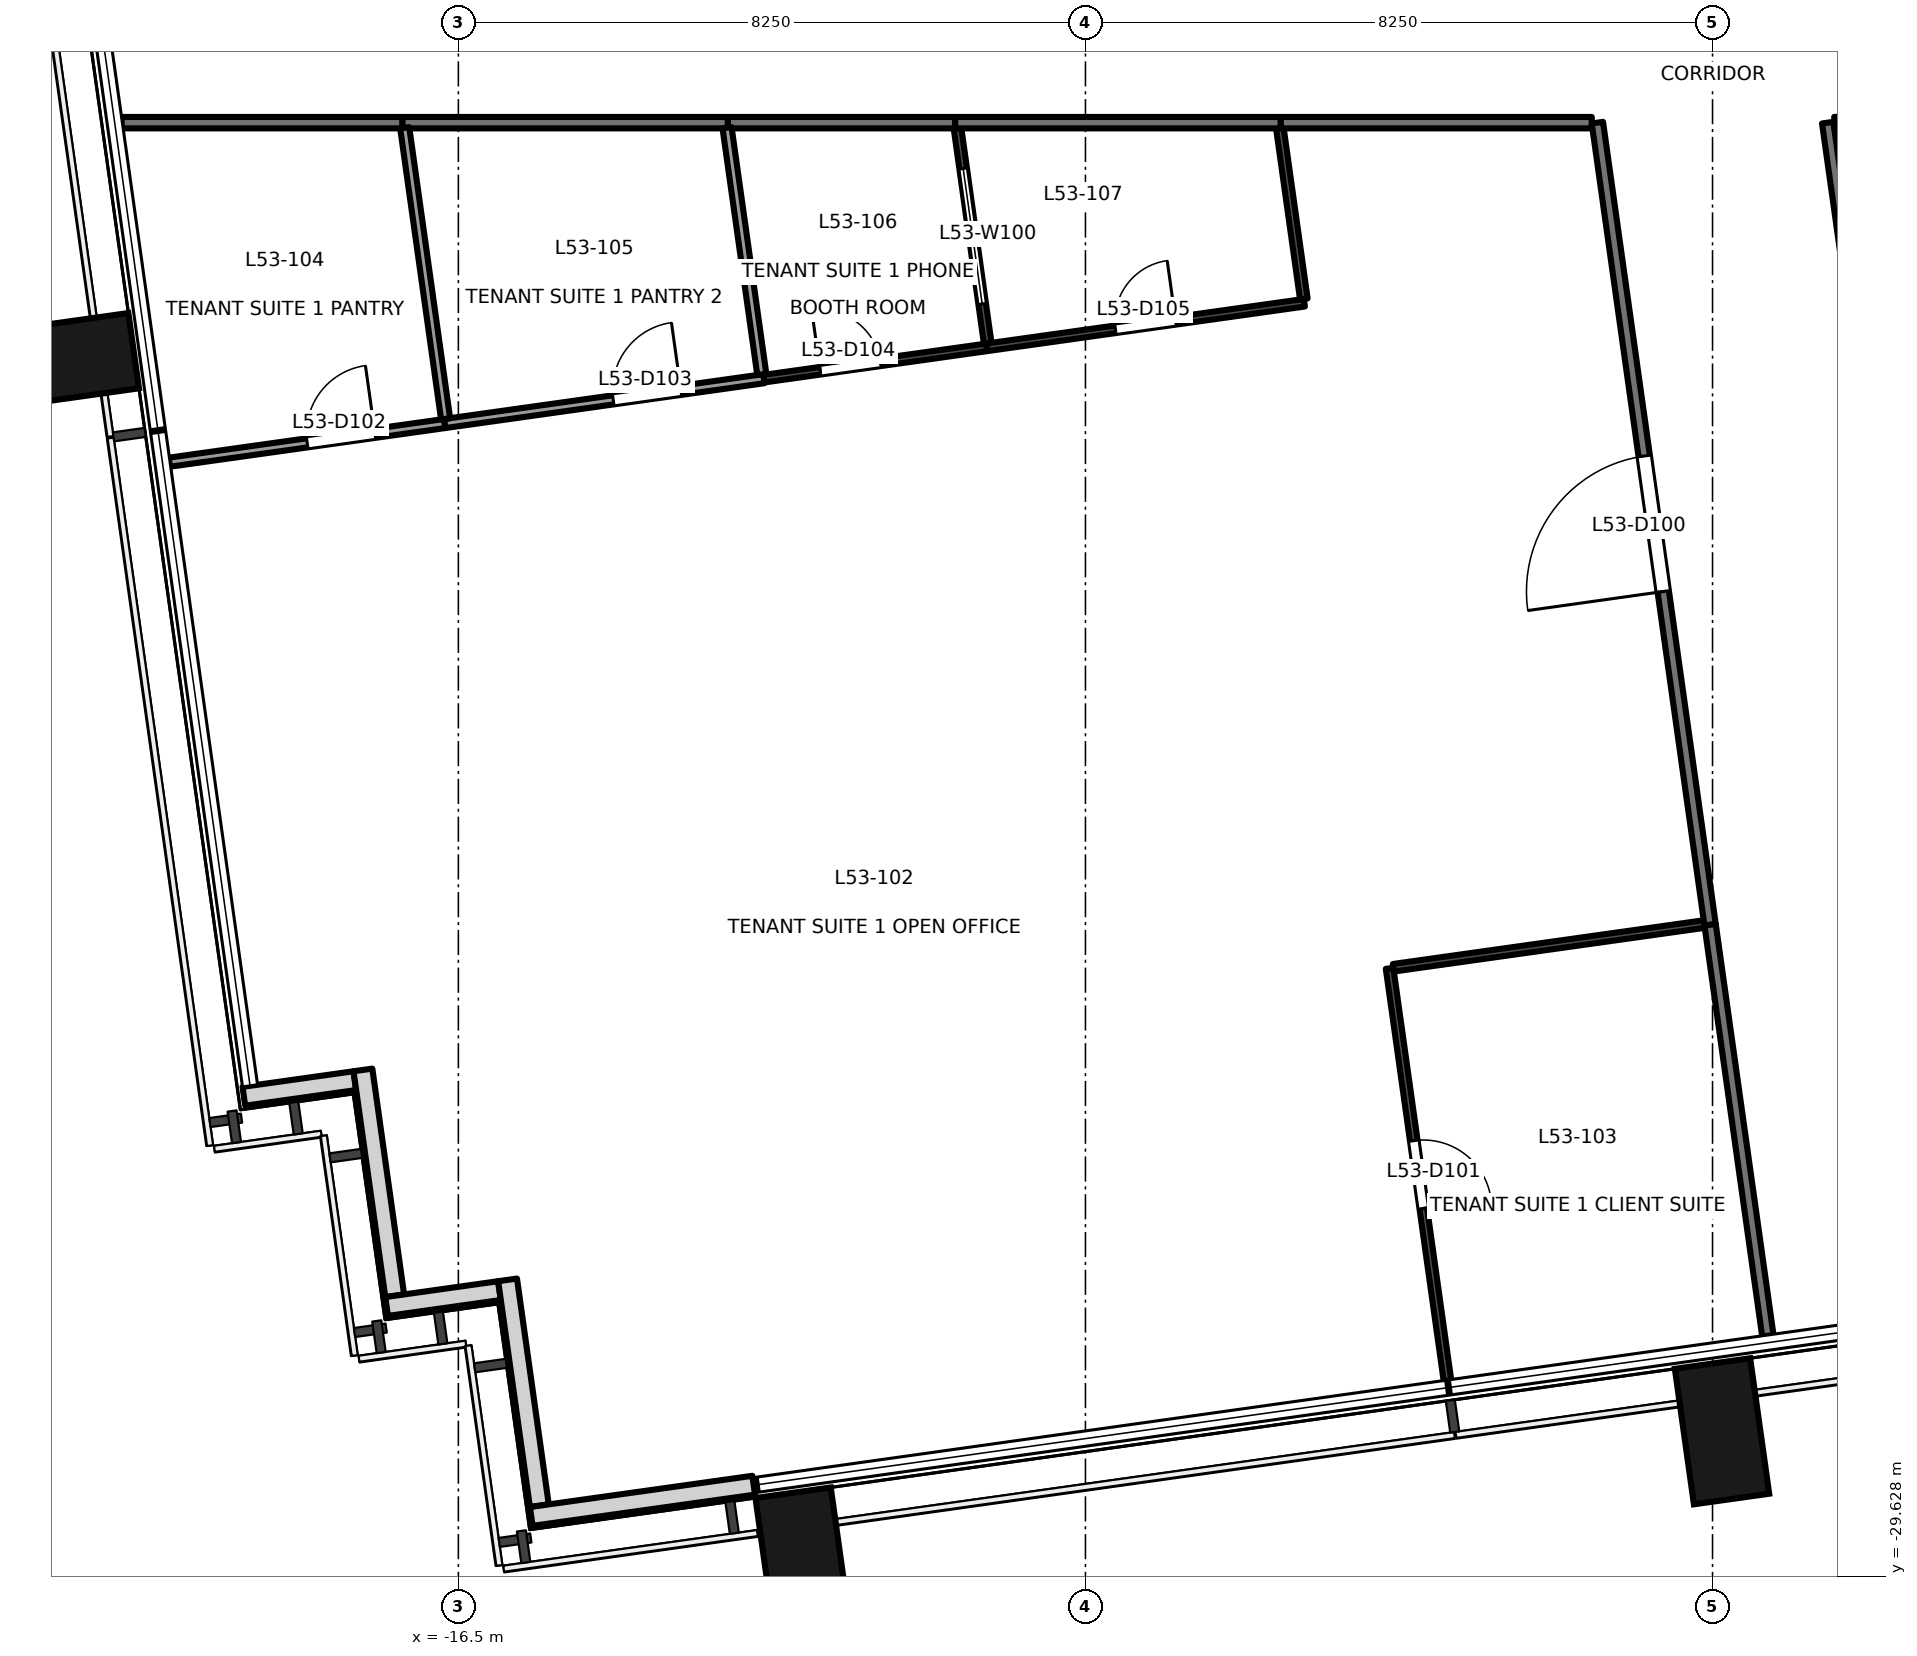
"""IFC4 building model, lengths in metres.
Left out: names, types, materials, properties, quantities, classifications, styles, units other than length and angle.
Written with IfcOpenShell. Run it as: python <this file> out.ifc"""

import sys

from ifc_helpers import new_model, si_unit, direction, frame, frame_2d, origin, origin_2d, place, context, subcontext, project, spatial, rectangle, extrude, element, fill, save


model = new_model("IFC4")
c1 = context("Model", 3, precision=1e-05, world=origin(), true_north=direction((0.0, 1.0)))
c2 = subcontext(c1, "Body", "Model", "MODEL_VIEW")
j1 = project(units=[si_unit("LENGTHUNIT", "METRE"), si_unit("PLANEANGLEUNIT", "RADIAN")], contexts=[c1])
p1 = place(None, origin())
s1 = spatial("IfcSite", under=j1, at=p1, CompositionType="ELEMENT")
p2 = place(p1, origin())
s2 = spatial("IfcBuilding", under=s1, at=p2, CompositionType="ELEMENT")
p3 = place(p2, frame((0.0, 0.0, 233.0)))
s3 = spatial("IfcBuildingStorey", under=s2, at=p3, CompositionType="ELEMENT", Elevation=233.0)
for number, where, z_axis, x_axis in (
    (1, (-11.971, -29.416, -0.2), (0.0, 0.0, 1.0), (0.99, 0.139, 0.0)),
    (2, (0.125, -27.716, -0.2), (0.0, 0.0, 1.0), (0.99, 0.139, 0.0)),
    (3, (-21.663, -13.625, -0.2), (0.0, 0.0, 1.0), (-0.139, 0.99, 0.0)),
):
    element("IfcColumn", number, at=place(p3, frame(where, z_axis=z_axis, x_axis=x_axis)), inside=s3, PredefinedType="COLUMN", context=c2, shape_type="SweptSolid", body=[
        extrude(rectangle(XDim=1.0, YDim=1.8, at=origin_2d()), origin(), (0.0, 0.0, 1.0), 3.9),
    ])
p4 = place(p3, frame((-19.322, -23.309, 0.0), z_axis=(0.0, 0.0, 1.0), x_axis=(0.990235520307, 0.13940449893, 0.0)))
e4 = element("IfcWall", 4, at=p4, inside=s3, PredefinedType="SOLIDWALL", context=c2, shape_type="SweptSolid", body=[
    extrude(rectangle(XDim=1.475, YDim=0.25, at=frame_2d((0.737, 0.0))), origin(), (0.0, 0.0, 1.0), 3.7),
])
p5 = place(p3, frame((-17.756, -22.962, 0.0), z_axis=(0.0, 0.0, 1.0), x_axis=(0.139393225799, -0.990237107263, 0.0)))
e5 = element("IfcWall", 5, at=p5, inside=s3, PredefinedType="SOLIDWALL", context=c2, shape_type="SweptSolid", body=[
    extrude(rectangle(XDim=3.0, YDim=0.25, at=frame_2d((1.5, 0.0))), origin(), (0.0, 0.0, 1.0), 3.7),
])
p6 = place(p3, frame((-17.444, -26.074, 0.0), z_axis=(0.0, 0.0, 1.0), x_axis=(0.990240434918, 0.139369584395, 0.0)))
e6 = element("IfcWall", 6, at=p6, inside=s3, PredefinedType="SOLIDWALL", context=c2, shape_type="SweptSolid", body=[
    extrude(rectangle(XDim=1.5, YDim=0.25, at=frame_2d((0.75, 0.0))), origin(), (0.0, 0.0, 1.0), 3.7),
])
p7 = place(p3, frame((-15.853, -25.724, 0.0), z_axis=(0.0, 0.0, 1.0), x_axis=(0.139302206688, -0.990249915532, 0.0)))
e7 = element("IfcWall", 7, at=p7, inside=s3, PredefinedType="SOLIDWALL", context=c2, shape_type="SweptSolid", body=[
    extrude(rectangle(XDim=3.0, YDim=0.25, at=frame_2d((1.5, 0.0))), origin(), (0.0, 0.0, 1.0), 3.7),
])
p8 = place(p3, frame((-15.541, -28.836, 0.0), z_axis=(0.0, 0.0, 1.0), x_axis=(0.990285396533, 0.139049751574, 0.0)))
e8 = element("IfcWall", 8, at=p8, inside=s3, PredefinedType="SOLIDWALL", context=c2, shape_type="SweptSolid", body=[
    extrude(rectangle(XDim=2.955, YDim=0.25, at=frame_2d((1.478, 0.0))), origin(), (0.0, 0.0, 1.0), 3.7),
])
p9 = place(p3, frame((-1.589, -10.5, 0.0), z_axis=(0.0, 0.0, 1.0), x_axis=(-1.0, 0.0, 0.0)))
e9 = element("IfcWall", 9, at=p9, inside=s3, PredefinedType="PARTITIONING", context=c2, shape_type="SweptSolid", body=[
    extrude(rectangle(XDim=4.094, YDim=0.15, at=frame_2d((2.047, 0.0))), origin(), (0.0, 0.0, 1.0), 2.8),
])
p10 = place(p3, frame((-0.032, -21.053, 0.0), z_axis=(0.0, 0.0, 1.0), x_axis=(-0.139153385275, 0.9902708394, 0.0)))
e10 = element("IfcWall", 10, at=p10, inside=s3, PredefinedType="PARTITIONING", context=c2, shape_type="SweptSolid", body=[
    extrude(rectangle(XDim=10.657, YDim=0.15, at=frame_2d((5.328, 0.0))), origin(), (0.0, 0.0, 1.0), 2.8),
])
p11 = place(p10, frame((4.428, 0.0, 0.0)))
e11 = element("IfcOpeningElement", 11, at=p11, cuts=e10, PredefinedType="OPENING", context=c2, shape_type="SweptSolid", body=[
    extrude(rectangle(XDim=1.8, YDim=2.1, at=frame_2d((0.9, 1.05))), frame((0.0, 0.085, 0.0), z_axis=(0.0, -1.0, 0.0), x_axis=(1.0, 0.0, 0.0)), (0.0, 0.0, 1.0), 0.171),
])
p12 = place(p3, frame((0.728, -26.46, 0.0), z_axis=(0.0, 0.0, 1.0), x_axis=(-0.139192487281, 0.990265343978, 0.0)))
e12 = element("IfcWall", 12, at=p12, inside=s3, PredefinedType="PARTITIONING", context=c2, shape_type="SweptSolid", body=[
    extrude(rectangle(XDim=5.46, YDim=0.15, at=frame_2d((2.73, 0.0))), origin(), (0.0, 0.0, 1.0), 2.8),
])
p13 = place(p3, frame((-17.235, -10.5, 0.0), z_axis=(0.0, 0.0, 1.0), x_axis=(-1.0, 0.0, 0.0)))
e13 = element("IfcWall", 13, at=p13, inside=s3, PredefinedType="PARTITIONING", context=c2, shape_type="SweptSolid", body=[
    extrude(rectangle(XDim=3.695, YDim=0.15, at=frame_2d((1.847, 0.0))), origin(), (0.0, 0.0, 1.0), 3.7),
])
p14 = place(p3, frame((-12.954, -10.5, 0.0), z_axis=(0.0, 0.0, 1.0), x_axis=(-1.0, 0.0, 0.0)))
e14 = element("IfcWall", 14, at=p14, inside=s3, PredefinedType="PARTITIONING", context=c2, shape_type="SweptSolid", body=[
    extrude(rectangle(XDim=4.281, YDim=0.15, at=frame_2d((2.141, 0.0))), origin(), (0.0, 0.0, 1.0), 3.7),
])
p15 = place(p3, frame((-9.964, -10.5, 0.0), z_axis=(0.0, 0.0, 1.0), x_axis=(-1.0, 0.0, 0.0)))
e15 = element("IfcWall", 15, at=p15, inside=s3, PredefinedType="PARTITIONING", context=c2, shape_type="SweptSolid", body=[
    extrude(rectangle(XDim=2.99, YDim=0.15, at=frame_2d((1.495, 0.0))), origin(), (0.0, 0.0, 1.0), 3.7),
])
p16 = place(p3, frame((-5.683, -10.5, 0.0), z_axis=(0.0, 0.0, 1.0), x_axis=(-1.0, 0.0, 0.0)))
e16 = element("IfcWall", 16, at=p16, inside=s3, PredefinedType="PARTITIONING", context=c2, shape_type="SweptSolid", body=[
    extrude(rectangle(XDim=4.281, YDim=0.15, at=frame_2d((2.141, 0.0))), origin(), (0.0, 0.0, 1.0), 2.8),
])
p17 = place(p3, frame((1.515, -10.5, 0.0), z_axis=(0.0, 0.0, 1.0), x_axis=(0.139146821365, -0.990271761742, 0.0)))
e17 = element("IfcWall", 17, at=p17, inside=s3, PredefinedType="PARTITIONING", context=c2, shape_type="SweptSolid", body=[
    extrude(rectangle(XDim=4.779, YDim=0.15, at=frame_2d((2.39, 0.0))), origin(), (0.0, 0.0, 1.0), 3.7),
])
p18 = place(p3, frame((4.524, -10.499, 0.0), z_axis=(0.0, 0.0, 1.0), x_axis=(-1.0, 0.0, 0.0)))
e18 = element("IfcWall", 18, at=p18, inside=s3, PredefinedType="PARTITIONING", context=c2, shape_type="SweptSolid", body=[
    extrude(rectangle(XDim=2.923, YDim=0.15, at=frame_2d((1.461, 0.0))), origin(), (0.0, 0.0, 1.0), 2.8),
])
p19 = place(p3, frame((-4.249, -21.625, 0.0), z_axis=(0.0, 0.0, 1.0), x_axis=(0.13906298859, -0.990283537783, 0.0)))
e19 = element("IfcWall", 19, at=p19, inside=s3, PredefinedType="PARTITIONING", context=c2, shape_type="SweptSolid", body=[
    extrude(rectangle(XDim=5.479, YDim=0.1, at=frame_2d((2.74, 0.0))), origin(), (0.0, 0.0, 1.0), 3.7),
])
p20 = place(p19, frame((2.29, 0.0, 0.0)))
e20 = element("IfcOpeningElement", 20, at=p20, cuts=e19, PredefinedType="OPENING", context=c2, shape_type="SweptSolid", body=[
    extrude(rectangle(XDim=0.9, YDim=2.1, at=frame_2d((0.45, 1.05))), frame((0.0, 0.061, 0.0), z_axis=(0.0, -1.0, 0.0), x_axis=(1.0, 0.0, 0.0)), (0.0, 0.0, 1.0), 0.121),
])
p21 = place(p3, frame((-0.109, -21.043, 0.0), z_axis=(0.0, 0.0, 1.0), x_axis=(-0.990263837068, -0.139203207563, 0.0)))
e21 = element("IfcWall", 21, at=p21, inside=s3, PredefinedType="PARTITIONING", context=c2, shape_type="SweptSolid", body=[
    extrude(rectangle(XDim=4.13, YDim=0.1, at=frame_2d((2.065, 0.0))), origin(), (0.0, 0.0, 1.0), 2.8),
])
p22 = place(p3, frame((-20.303, -14.967, 0.0), z_axis=(0.0, 0.0, 1.0), x_axis=(0.990278989802, 0.139095371445, 0.0)))
e22 = element("IfcWall", 22, at=p22, inside=s3, PredefinedType="PARTITIONING", context=c2, shape_type="SweptSolid", body=[
    extrude(rectangle(XDim=3.66, YDim=0.12, at=frame_2d((1.83, 0.0))), origin(), (0.0, 0.0, 1.0), 3.7),
])
p23 = place(p22, frame((1.832, 0.0, 0.0)))
e23 = element("IfcOpeningElement", 23, at=p23, cuts=e22, PredefinedType="OPENING", context=c2, shape_type="SweptSolid", body=[
    extrude(rectangle(XDim=0.9, YDim=2.1, at=frame_2d((0.45, 1.05))), frame((0.0, 0.071, 0.0), z_axis=(0.0, -1.0, 0.0), x_axis=(1.0, 0.0, 0.0)), (0.0, 0.0, 1.0), 0.141),
])
p24 = place(p3, frame((-16.679, -14.458, 0.0), z_axis=(0.0, 0.0, 1.0), x_axis=(0.990269352743, 0.139163964508, 0.0)))
e24 = element("IfcWall", 24, at=p24, inside=s3, PredefinedType="PARTITIONING", context=c2, shape_type="SweptSolid", body=[
    extrude(rectangle(XDim=4.24, YDim=0.12, at=frame_2d((2.12, 0.0))), origin(), (0.0, 0.0, 1.0), 3.7),
])
p25 = place(p24, frame((2.238, 0.0, 0.0)))
e25 = element("IfcOpeningElement", 25, at=p25, cuts=e24, PredefinedType="OPENING", context=c2, shape_type="SweptSolid", body=[
    extrude(rectangle(XDim=0.9, YDim=2.1, at=frame_2d((0.45, 1.05))), frame((0.0, 0.071, 0.0), z_axis=(0.0, -1.0, 0.0), x_axis=(1.0, 0.0, 0.0)), (0.0, 0.0, 1.0), 0.141),
])
p26 = place(p3, frame((-12.48, -13.868, 0.0), z_axis=(0.0, 0.0, 1.0), x_axis=(0.990270259545, 0.139157511691, 0.0)))
e26 = element("IfcWall", 26, at=p26, inside=s3, PredefinedType="PARTITIONING", context=c2, shape_type="SweptSolid", body=[
    extrude(rectangle(XDim=2.96, YDim=0.1, at=frame_2d((1.48, 0.0))), origin(), (0.0, 0.0, 1.0), 3.7),
])
p27 = place(p26, frame((0.748, 0.0, 0.0)))
e27 = element("IfcOpeningElement", 27, at=p27, cuts=e26, PredefinedType="OPENING", context=c2, shape_type="SweptSolid", body=[
    extrude(rectangle(XDim=0.8, YDim=2.1, at=frame_2d((0.4, 1.05))), frame((0.0, 0.061, 0.0), z_axis=(0.0, -1.0, 0.0), x_axis=(1.0, 0.0, 0.0)), (0.0, 0.0, 1.0), 0.121),
])
p28 = place(p3, frame((-9.549, -13.456, 0.0), z_axis=(0.0, 0.0, 1.0), x_axis=(0.99027315077, 0.139136935655, 0.0)))
e28 = element("IfcWall", 28, at=p28, inside=s3, PredefinedType="PARTITIONING", context=c2, shape_type="SweptSolid", body=[
    extrude(rectangle(XDim=4.22, YDim=0.1, at=frame_2d((2.11, 0.0))), origin(), (0.0, 0.0, 1.0), 2.8),
])
p29 = place(p28, frame((1.71, 0.0, 0.0)))
e29 = element("IfcOpeningElement", 29, at=p29, cuts=e28, PredefinedType="OPENING", context=c2, shape_type="SweptSolid", body=[
    extrude(rectangle(XDim=0.8, YDim=2.1, at=frame_2d((0.4, 1.05))), frame((0.0, 0.061, 0.0), z_axis=(0.0, -1.0, 0.0), x_axis=(1.0, 0.0, 0.0)), (0.0, 0.0, 1.0), 0.121),
])
p30 = place(p3, frame((-5.377, -12.819, 0.0), z_axis=(0.0, 0.0, 1.0), x_axis=(-0.139090262588, 0.990279707382, 0.0)))
e30 = element("IfcWall", 30, at=p30, inside=s3, PredefinedType="PARTITIONING", context=c2, shape_type="SweptSolid", body=[
    extrude(rectangle(XDim=2.273, YDim=0.1, at=frame_2d((1.137, 0.0))), origin(), (0.0, 0.0, 1.0), 3.7),
])
p31 = place(p3, frame((-17.206, -10.567, 0.0), z_axis=(0.0, 0.0, 1.0), x_axis=(0.139158089335, -0.990270178372, 0.0)))
e31 = element("IfcWall", 31, at=p31, inside=s3, PredefinedType="PARTITIONING", context=c2, shape_type="SweptSolid", body=[
    extrude(rectangle(XDim=3.867, YDim=0.12, at=frame_2d((1.933, 0.0))), origin(), (0.0, 0.0, 1.0), 3.7),
])
p32 = place(p3, frame((-12.965, -10.567, 0.0), z_axis=(0.0, 0.0, 1.0), x_axis=(0.139460290977, -0.990227664348, 0.0)))
e32 = element("IfcWall", 32, at=p32, inside=s3, PredefinedType="PARTITIONING", context=c2, shape_type="SweptSolid", body=[
    extrude(rectangle(XDim=3.277, YDim=0.12, at=frame_2d((1.639, 0.0))), origin(), (0.0, 0.0, 1.0), 3.7),
])
p33 = place(p3, frame((-9.934, -10.568, 0.0), z_axis=(0.0, 0.0, 1.0), x_axis=(0.139092802353, -0.990279350655, 0.0)))
e33 = element("IfcWall", 33, at=p33, inside=s3, PredefinedType="PARTITIONING", context=c2, shape_type="SweptSolid", body=[
    extrude(rectangle(XDim=2.863, YDim=0.1, at=frame_2d((1.431, 0.0))), origin(), (0.0, 0.0, 1.0), 3.7),
])
p34 = place(p33, frame((0.54, 0.0, 0.9)))
e34 = element("IfcOpeningElement", 34, at=p34, cuts=e33, PredefinedType="OPENING", context=c2, shape_type="SweptSolid", body=[
    extrude(rectangle(XDim=1.8, YDim=1.2, at=frame_2d((0.9, 0.6))), frame((0.0, 0.061, 0.0), z_axis=(0.0, -1.0, 0.0), x_axis=(1.0, 0.0, 0.0)), (0.0, 0.0, 1.0), 0.121),
])
p35 = place(p11, origin())
e35 = element("IfcDoor", 35, at=p35, inside=s3, OperationType="DOUBLE_DOOR_SINGLE_SWING", PredefinedType="DOOR", context=c2, shape_type="SweptSolid", body=[
    extrude(rectangle(XDim=1.8, YDim=2.1, at=frame_2d((0.9, 1.05))), frame((0.0, 0.025, 0.0), z_axis=(0.0, -1.0, 0.0), x_axis=(1.0, 0.0, 0.0)), (0.0, 0.0, 1.0), 0.05),
])
fill(e11, e35)
p36 = place(p20, origin())
e36 = element("IfcDoor", 36, at=p36, inside=s3, OperationType="SINGLE_SWING_RIGHT", PredefinedType="DOOR", context=c2, shape_type="SweptSolid", body=[
    extrude(rectangle(XDim=0.9, YDim=2.1, at=frame_2d((0.45, 1.05))), frame((0.0, 0.025, 0.0), z_axis=(0.0, -1.0, 0.0), x_axis=(1.0, 0.0, 0.0)), (0.0, 0.0, 1.0), 0.05),
])
fill(e20, e36)
p37 = place(p23, origin())
e37 = element("IfcDoor", 37, at=p37, inside=s3, OperationType="SINGLE_SWING_RIGHT", PredefinedType="DOOR", context=c2, shape_type="SweptSolid", body=[
    extrude(rectangle(XDim=0.9, YDim=2.1, at=frame_2d((0.45, 1.05))), frame((0.0, 0.025, 0.0), z_axis=(0.0, -1.0, 0.0), x_axis=(1.0, 0.0, 0.0)), (0.0, 0.0, 1.0), 0.05),
])
fill(e23, e37)
p38 = place(p25, origin())
e38 = element("IfcDoor", 38, at=p38, inside=s3, OperationType="SINGLE_SWING_RIGHT", PredefinedType="DOOR", context=c2, shape_type="SweptSolid", body=[
    extrude(rectangle(XDim=0.9, YDim=2.1, at=frame_2d((0.45, 1.05))), frame((0.0, 0.025, 0.0), z_axis=(0.0, -1.0, 0.0), x_axis=(1.0, 0.0, 0.0)), (0.0, 0.0, 1.0), 0.05),
])
fill(e25, e38)
p39 = place(p27, origin())
e39 = element("IfcDoor", 39, at=p39, inside=s3, OperationType="SINGLE_SWING_LEFT", PredefinedType="DOOR", context=c2, shape_type="SweptSolid", body=[
    extrude(rectangle(XDim=0.8, YDim=2.1, at=frame_2d((0.4, 1.05))), frame((0.0, 0.025, 0.0), z_axis=(0.0, -1.0, 0.0), x_axis=(1.0, 0.0, 0.0)), (0.0, 0.0, 1.0), 0.05),
])
fill(e27, e39)
p40 = place(p29, origin())
e40 = element("IfcDoor", 40, at=p40, inside=s3, OperationType="SINGLE_SWING_RIGHT", PredefinedType="DOOR", context=c2, shape_type="SweptSolid", body=[
    extrude(rectangle(XDim=0.8, YDim=2.1, at=frame_2d((0.4, 1.05))), frame((0.0, 0.025, 0.0), z_axis=(0.0, -1.0, 0.0), x_axis=(1.0, 0.0, 0.0)), (0.0, 0.0, 1.0), 0.05),
])
fill(e29, e40)
p41 = place(p34, origin())
e41 = element("IfcWindow", 41, at=p41, inside=s3, PartitioningType="SINGLE_PANEL", PredefinedType="WINDOW", context=c2, shape_type="SweptSolid", body=[
    extrude(rectangle(XDim=1.8, YDim=1.2, at=frame_2d((0.9, 0.6))), frame((0.0, 0.03, 0.0), z_axis=(0.0, -1.0, 0.0), x_axis=(1.0, 0.0, 0.0)), (0.0, 0.0, 1.0), 0.06),
])
fill(e34, e41)
save(model, sys.argv[1])
